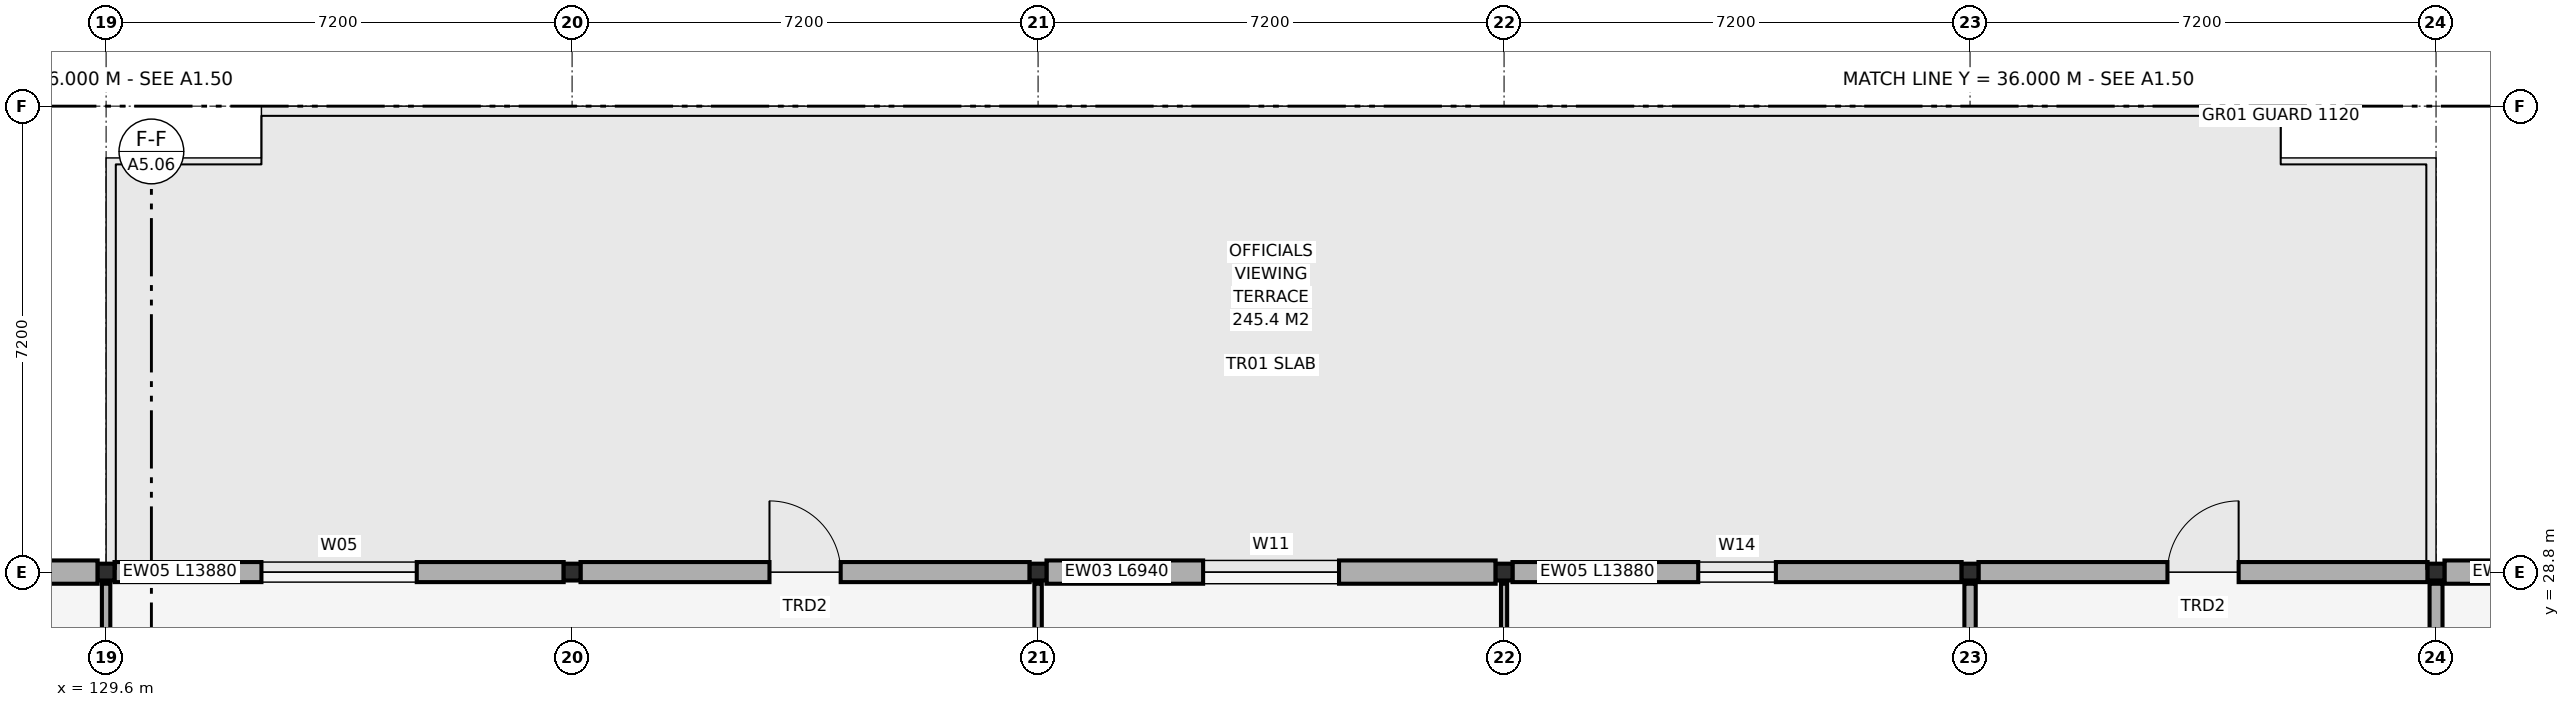
"""IFC4 building model, lengths in metres.
Left out: names, types, materials, properties, quantities, classifications, styles, units other than length and angle.
Written with IfcOpenShell. Run it as: python <this file> out.ifc"""

import sys

from ifc_helpers import new_model, si_unit, direction, frame, frame_2d, origin, origin_2d, place, context, subcontext, project, spatial, rectangle, hollow_rectangle, extrude, element, fill, save


model = new_model("IFC4")
c1 = context("Model", 3, precision=1e-05, world=origin(), true_north=direction((0.0, 1.0)))
c2 = subcontext(c1, "Body", "Model", "MODEL_VIEW")
j1 = project(units=[si_unit("LENGTHUNIT", "METRE"), si_unit("PLANEANGLEUNIT", "RADIAN")], contexts=[c1])
p1 = place(None, origin())
s1 = spatial("IfcSite", under=j1, at=p1, CompositionType="ELEMENT")
p2 = place(p1, origin())
s2 = spatial("IfcBuilding", under=s1, at=p2, CompositionType="ELEMENT")
p3 = place(p2, frame((0.0, 0.0, 23.4)))
s3 = spatial("IfcBuildingStorey", under=s2, at=p3, CompositionType="ELEMENT", Elevation=23.4)
for number, where, z_axis, x_axis in (
    (1, (129.6, 28.8, 0.0), (0.0, 0.0, 1.0), (1.0, 0.0, 0.0)),
    (2, (136.8, 28.8, 0.0), (0.0, 0.0, 1.0), (1.0, 0.0, 0.0)),
    (3, (144.0, 28.8, 0.0), (0.0, 0.0, 1.0), (1.0, 0.0, 0.0)),
    (4, (151.2, 28.8, 0.0), (0.0, 0.0, 1.0), (1.0, 0.0, 0.0)),
    (5, (158.4, 28.8, 0.0), (0.0, 0.0, 1.0), (1.0, 0.0, 0.0)),
    (6, (165.6, 28.8, 0.0), (0.0, 0.0, 1.0), (1.0, 0.0, 0.0)),
):
    element("IfcColumn", number, at=place(p3, frame(where, z_axis=z_axis, x_axis=x_axis)), inside=s3, PredefinedType="COLUMN", context=c2, shape_type="SweptSolid", body=[
        extrude(hollow_rectangle(XDim=0.26, YDim=0.26, WallThickness=0.012, at=origin_2d()), origin(), (0.0, 0.0, 1.0), 4.2),
    ])
p4 = place(p3, frame((122.53, 28.8, 0.0), z_axis=(0.0, 0.0, 1.0), x_axis=(1.0, 0.0, 0.0)))
e7 = element("IfcWall", 7, at=p4, inside=s3, PredefinedType="SOLIDWALL", context=c2, shape_type="SweptSolid", body=[
    extrude(rectangle(XDim=6.94, YDim=0.36, at=frame_2d((3.47, 0.0))), origin(), (0.0, 0.0, 1.0), 3.98),
])
p5 = place(p4, frame((2.42, 0.0, 0.95)))
e8 = element("IfcOpeningElement", 8, at=p5, cuts=e7, PredefinedType="OPENING", context=c2, shape_type="SweptSolid", body=[
    extrude(rectangle(XDim=2.1, YDim=2.65, at=frame_2d((1.05, 1.325))), frame((0.0, 0.195, 0.0), z_axis=(0.0, -1.0, 0.0), x_axis=(1.0, 0.0, 0.0)), (0.0, 0.0, 1.0), 0.39),
])
p6 = place(p3, frame((129.73, 28.8, 0.0), z_axis=(0.0, 0.0, 1.0), x_axis=(1.0, 0.0, 0.0)))
e9 = element("IfcWall", 9, at=p6, inside=s3, PredefinedType="SOLIDWALL", context=c2, shape_type="SweptSolid", body=[
    extrude(rectangle(XDim=6.94, YDim=0.31, at=frame_2d((3.47, 0.0))), origin(), (0.0, 0.0, 1.0), 3.98),
])
p7 = place(p6, frame((2.27, 0.0, 0.95)))
e10 = element("IfcOpeningElement", 10, at=p7, cuts=e9, PredefinedType="OPENING", context=c2, shape_type="SweptSolid", body=[
    extrude(rectangle(XDim=2.4, YDim=2.0, at=frame_2d((1.2, 1.0))), frame((0.0, 0.17, 0.0), z_axis=(0.0, -1.0, 0.0), x_axis=(1.0, 0.0, 0.0)), (0.0, 0.0, 1.0), 0.34),
])
p8 = place(p3, frame((136.93, 28.8, 0.0), z_axis=(0.0, 0.0, 1.0), x_axis=(1.0, 0.0, 0.0)))
e11 = element("IfcWall", 11, at=p8, inside=s3, PredefinedType="SOLIDWALL", context=c2, shape_type="SweptSolid", body=[
    extrude(rectangle(XDim=6.94, YDim=0.31, at=frame_2d((3.47, 0.0))), origin(), (0.0, 0.0, 1.0), 3.98),
])
p9 = place(p8, frame((2.92, 0.0, 0.0)))
e12 = element("IfcOpeningElement", 12, at=p9, cuts=e11, PredefinedType="OPENING", context=c2, shape_type="SweptSolid", body=[
    extrude(rectangle(XDim=1.1, YDim=2.2, at=frame_2d((0.55, 1.1))), frame((0.0, 0.17, 0.0), z_axis=(0.0, -1.0, 0.0), x_axis=(1.0, 0.0, 0.0)), (0.0, 0.0, 1.0), 0.34),
])
p10 = place(p3, frame((144.13, 28.8, 0.0), z_axis=(0.0, 0.0, 1.0), x_axis=(1.0, 0.0, 0.0)))
e13 = element("IfcWall", 13, at=p10, inside=s3, PredefinedType="SOLIDWALL", context=c2, shape_type="SweptSolid", body=[
    extrude(rectangle(XDim=6.94, YDim=0.36, at=frame_2d((3.47, 0.0))), origin(), (0.0, 0.0, 1.0), 3.98),
])
p11 = place(p10, frame((2.42, 0.0, 0.95)))
e14 = element("IfcOpeningElement", 14, at=p11, cuts=e13, PredefinedType="OPENING", context=c2, shape_type="SweptSolid", body=[
    extrude(rectangle(XDim=2.1, YDim=1.75, at=frame_2d((1.05, 0.875))), frame((0.0, 0.195, 0.0), z_axis=(0.0, -1.0, 0.0), x_axis=(1.0, 0.0, 0.0)), (0.0, 0.0, 1.0), 0.39),
])
p12 = place(p3, frame((151.33, 28.8, 0.0), z_axis=(0.0, 0.0, 1.0), x_axis=(1.0, 0.0, 0.0)))
e15 = element("IfcWall", 15, at=p12, inside=s3, PredefinedType="SOLIDWALL", context=c2, shape_type="SweptSolid", body=[
    extrude(rectangle(XDim=6.94, YDim=0.31, at=frame_2d((3.47, 0.0))), origin(), (0.0, 0.0, 1.0), 3.98),
])
p13 = place(p12, frame((2.87, 0.0, 0.95)))
e16 = element("IfcOpeningElement", 16, at=p13, cuts=e15, PredefinedType="OPENING", context=c2, shape_type="SweptSolid", body=[
    extrude(rectangle(XDim=1.2, YDim=1.75, at=frame_2d((0.6, 0.875))), frame((0.0, 0.17, 0.0), z_axis=(0.0, -1.0, 0.0), x_axis=(1.0, 0.0, 0.0)), (0.0, 0.0, 1.0), 0.34),
])
p14 = place(p3, frame((158.53, 28.8, 0.0), z_axis=(0.0, 0.0, 1.0), x_axis=(1.0, 0.0, 0.0)))
e17 = element("IfcWall", 17, at=p14, inside=s3, PredefinedType="SOLIDWALL", context=c2, shape_type="SweptSolid", body=[
    extrude(rectangle(XDim=6.94, YDim=0.31, at=frame_2d((3.47, 0.0))), origin(), (0.0, 0.0, 1.0), 3.98),
])
p15 = place(p14, frame((2.92, 0.0, 0.0)))
e18 = element("IfcOpeningElement", 18, at=p15, cuts=e17, PredefinedType="OPENING", context=c2, shape_type="SweptSolid", body=[
    extrude(rectangle(XDim=1.1, YDim=2.2, at=frame_2d((0.55, 1.1))), frame((0.0, 0.17, 0.0), z_axis=(0.0, -1.0, 0.0), x_axis=(1.0, 0.0, 0.0)), (0.0, 0.0, 1.0), 0.34),
])
p16 = place(p3, frame((165.73, 28.8, 0.0), z_axis=(0.0, 0.0, 1.0), x_axis=(1.0, 0.0, 0.0)))
e19 = element("IfcWall", 19, at=p16, inside=s3, PredefinedType="SOLIDWALL", context=c2, shape_type="SweptSolid", body=[
    extrude(rectangle(XDim=6.94, YDim=0.36, at=frame_2d((3.47, 0.0))), origin(), (0.0, 0.0, 1.0), 3.98),
])
p17 = place(p16, frame((2.72, 0.0, 0.95)))
e20 = element("IfcOpeningElement", 20, at=p17, cuts=e19, PredefinedType="OPENING", context=c2, shape_type="SweptSolid", body=[
    extrude(rectangle(XDim=1.5, YDim=2.2, at=frame_2d((0.75, 1.1))), frame((0.0, 0.195, 0.0), z_axis=(0.0, -1.0, 0.0), x_axis=(1.0, 0.0, 0.0)), (0.0, 0.0, 1.0), 0.39),
])
p18 = place(p3, frame((129.6, 21.78, 0.0), z_axis=(0.0, 0.0, 1.0), x_axis=(0.0, 1.0, 0.0)))
e21 = element("IfcWall", 21, at=p18, inside=s3, PredefinedType="PARTITIONING", context=c2, shape_type="SweptSolid", body=[
    extrude(rectangle(XDim=6.84, YDim=0.13, at=frame_2d((3.42, 0.0))), origin(), (0.0, 0.0, 1.0), 3.98),
])
p19 = place(p18, frame((2.32, 0.0, 0.95)))
e22 = element("IfcOpeningElement", 22, at=p19, cuts=e21, PredefinedType="OPENING", context=c2, shape_type="SweptSolid", body=[
    extrude(rectangle(XDim=2.2, YDim=1.35, at=frame_2d((1.1, 0.675))), frame((0.0, 0.08, 0.0), z_axis=(0.0, -1.0, 0.0), x_axis=(1.0, 0.0, 0.0)), (0.0, 0.0, 1.0), 0.16),
])
p20 = place(p3, frame((144.0, 21.78, 0.0), z_axis=(0.0, 0.0, 1.0), x_axis=(0.0, 1.0, 0.0)))
e23 = element("IfcWall", 23, at=p20, inside=s3, PredefinedType="PARTITIONING", context=c2, shape_type="SweptSolid", body=[
    extrude(rectangle(XDim=6.84, YDim=0.115, at=frame_2d((3.42, 0.0))), origin(), (0.0, 0.0, 1.0), 3.98),
])
p21 = place(p20, frame((2.47, 0.0, 0.95)))
e24 = element("IfcOpeningElement", 24, at=p21, cuts=e23, PredefinedType="OPENING", context=c2, shape_type="SweptSolid", body=[
    extrude(rectangle(XDim=1.9, YDim=1.35, at=frame_2d((0.95, 0.675))), frame((0.0, 0.072, 0.0), z_axis=(0.0, -1.0, 0.0), x_axis=(1.0, 0.0, 0.0)), (0.0, 0.0, 1.0), 0.145),
])
p22 = place(p3, frame((151.2, 21.78, 0.0), z_axis=(0.0, 0.0, 1.0), x_axis=(0.0, 1.0, 0.0)))
e25 = element("IfcWall", 25, at=p22, inside=s3, PredefinedType="PARTITIONING", context=c2, shape_type="SweptSolid", body=[
    extrude(rectangle(XDim=6.84, YDim=0.095, at=frame_2d((3.42, 0.0))), origin(), (0.0, 0.0, 1.0), 3.98),
])
p23 = place(p22, frame((2.62, 0.0, 0.95)))
e26 = element("IfcOpeningElement", 26, at=p23, cuts=e25, PredefinedType="OPENING", context=c2, shape_type="SweptSolid", body=[
    extrude(rectangle(XDim=1.6, YDim=1.35, at=frame_2d((0.8, 0.675))), frame((0.0, 0.062, 0.0), z_axis=(0.0, -1.0, 0.0), x_axis=(1.0, 0.0, 0.0)), (0.0, 0.0, 1.0), 0.125),
])
p24 = place(p3, frame((158.4, 21.78, 0.0), z_axis=(0.0, 0.0, 1.0), x_axis=(0.0, 1.0, 0.0)))
e27 = element("IfcWall", 27, at=p24, inside=s3, PredefinedType="PARTITIONING", context=c2, shape_type="SweptSolid", body=[
    extrude(rectangle(XDim=6.84, YDim=0.175, at=frame_2d((3.42, 0.0))), origin(), (0.0, 0.0, 1.0), 3.98),
])
p25 = place(p3, frame((165.6, 21.78, 0.0), z_axis=(0.0, 0.0, 1.0), x_axis=(0.0, 1.0, 0.0)))
e28 = element("IfcWall", 28, at=p25, inside=s3, PredefinedType="SOLIDWALL", context=c2, shape_type="SweptSolid", body=[
    extrude(rectangle(XDim=6.84, YDim=0.2, at=frame_2d((3.42, 0.0))), origin(), (0.0, 0.0, 1.0), 3.98),
])
p26 = place(p25, frame((2.945, 0.0, 0.0)))
e29 = element("IfcOpeningElement", 29, at=p26, cuts=e28, PredefinedType="OPENING", context=c2, shape_type="SweptSolid", body=[
    extrude(rectangle(XDim=0.95, YDim=2.1, at=frame_2d((0.475, 1.05))), frame((0.0, 0.115, 0.0), z_axis=(0.0, -1.0, 0.0), x_axis=(1.0, 0.0, 0.0)), (0.0, 0.0, 1.0), 0.23),
])
p27 = place(p7, origin())
e30 = element("IfcWindow", 30, at=p27, inside=s3, PartitioningType="SINGLE_PANEL", PredefinedType="WINDOW", context=c2, shape_type="SweptSolid", body=[
    extrude(rectangle(XDim=2.4, YDim=2.0, at=frame_2d((1.2, 1.0))), frame((0.0, 0.03, 0.0), z_axis=(0.0, -1.0, 0.0), x_axis=(1.0, 0.0, 0.0)), (0.0, 0.0, 1.0), 0.06),
])
fill(e10, e30)
p28 = place(p9, origin())
e31 = element("IfcDoor", 31, at=p28, inside=s3, OperationType="SINGLE_SWING_LEFT", PredefinedType="DOOR", context=c2, shape_type="SweptSolid", body=[
    extrude(rectangle(XDim=1.1, YDim=2.2, at=frame_2d((0.55, 1.1))), frame((0.0, 0.025, 0.0), z_axis=(0.0, -1.0, 0.0), x_axis=(1.0, 0.0, 0.0)), (0.0, 0.0, 1.0), 0.05),
])
fill(e12, e31)
p29 = place(p11, origin())
e32 = element("IfcWindow", 32, at=p29, inside=s3, PartitioningType="SINGLE_PANEL", PredefinedType="WINDOW", context=c2, shape_type="SweptSolid", body=[
    extrude(rectangle(XDim=2.1, YDim=1.75, at=frame_2d((1.05, 0.875))), frame((0.0, 0.03, 0.0), z_axis=(0.0, -1.0, 0.0), x_axis=(1.0, 0.0, 0.0)), (0.0, 0.0, 1.0), 0.06),
])
fill(e14, e32)
p30 = place(p13, origin())
e33 = element("IfcWindow", 33, at=p30, inside=s3, PartitioningType="SINGLE_PANEL", PredefinedType="WINDOW", context=c2, shape_type="SweptSolid", body=[
    extrude(rectangle(XDim=1.2, YDim=1.75, at=frame_2d((0.6, 0.875))), frame((0.0, 0.03, 0.0), z_axis=(0.0, -1.0, 0.0), x_axis=(1.0, 0.0, 0.0)), (0.0, 0.0, 1.0), 0.06),
])
fill(e16, e33)
p31 = place(p15, origin())
e34 = element("IfcDoor", 34, at=p31, inside=s3, OperationType="SINGLE_SWING_RIGHT", PredefinedType="DOOR", context=c2, shape_type="SweptSolid", body=[
    extrude(rectangle(XDim=1.1, YDim=2.2, at=frame_2d((0.55, 1.1))), frame((0.0, 0.025, 0.0), z_axis=(0.0, -1.0, 0.0), x_axis=(1.0, 0.0, 0.0)), (0.0, 0.0, 1.0), 0.05),
])
fill(e18, e34)
save(model, sys.argv[1])
